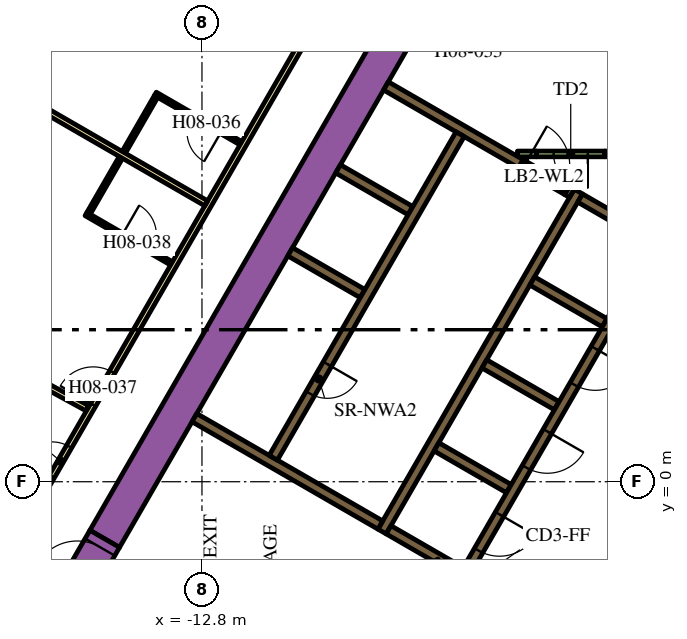
"""IFC4 building model, lengths in metres.
Left out: names, types, materials, properties, quantities, classifications, styles, units other than length and angle.
Written with IfcOpenShell. Run it as: python <this file> out.ifc"""

import sys

from ifc_helpers import new_model, si_unit, direction, frame, frame_2d, origin, place, context, subcontext, project, spatial, polyline, rectangle, outline, extrude, element, fill, save


model = new_model("IFC4")
c1 = context("Model", 3, precision=1e-05, world=origin(), true_north=direction((0.0, 1.0)))
c2 = subcontext(c1, "Body", "Model", "MODEL_VIEW")
j1 = project(units=[si_unit("LENGTHUNIT", "METRE"), si_unit("PLANEANGLEUNIT", "RADIAN")], contexts=[c1])
p1 = place(None, origin())
s1 = spatial("IfcSite", under=j1, at=p1, CompositionType="ELEMENT")
p2 = place(p1, origin())
s2 = spatial("IfcBuilding", under=s1, at=p2, CompositionType="ELEMENT")
p3 = place(p2, frame((0.0, 0.0, 107.1)))
s3 = spatial("IfcBuildingStorey", under=s2, at=p3, CompositionType="ELEMENT", Elevation=107.1)
p4 = place(p3, frame((-15.36, -1.503, 0.0), z_axis=(0.0, 0.0, 1.0), x_axis=(0.50000389221, 0.866023156604, 0.0)))
e1 = element("IfcWall", 1, at=p4, inside=s3, PredefinedType="SOLIDWALL", context=c2, shape_type="SweptSolid", body=[
    extrude(rectangle(XDim=21.0, YDim=0.9, at=frame_2d((10.5, 0.0))), origin(), (0.0, 0.0, 1.0), 3.9),
])
p5 = place(p3, frame((-8.06, -1.311, 0.0), z_axis=(0.0, 0.0, 1.0), x_axis=(0.50000273126, 0.866023826885, 0.0)))
e2 = element("IfcWall", 2, at=p5, inside=s3, PredefinedType="SOLIDWALL", context=c2, shape_type="SweptSolid", body=[
    extrude(rectangle(XDim=10.33, YDim=0.25, at=frame_2d((5.165, 0.0))), origin(), (0.0, 0.0, 1.0), 3.9),
])
p6 = place(p3, frame((-1.76, 6.836, 0.0), z_axis=(0.0, 0.0, 1.0), x_axis=(-0.865952863304, 0.500125622755, 0.0)))
e3 = element("IfcWall", 3, at=p6, inside=s3, PredefinedType="SOLIDWALL", context=c2, shape_type="SweptSolid", body=[
    extrude(rectangle(XDim=1.258, YDim=0.25, at=frame_2d((0.629, 0.0))), origin(), (0.0, 0.0, 1.0), 3.9),
])
for number, where, z_axis, x_axis in (
    (4, (-2.204, 4.182, 0.0), (0.0, 0.0, 1.0), (-0.866, 0.5, 0.0)),
    (5, (-5.369, 3.1, 0.0), (0.0, 0.0, 1.0), (0.866, -0.5, 0.0)),
    (6, (-4.724, -0.182, 0.0), (0.0, 0.0, 1.0), (-0.866, 0.5, 0.0)),
):
    element("IfcWall", number, at=place(p3, frame(where, z_axis=z_axis, x_axis=x_axis)), inside=s3, PredefinedType="SOLIDWALL", context=c2, shape_type="SweptSolid", body=[
        extrude(rectangle(XDim=2.2, YDim=0.25, at=frame_2d((1.1, 0.0))), origin(), (0.0, 0.0, 1.0), 3.9),
    ])
p7 = place(p3, origin())
e7 = element("IfcWall", 7, at=p7, inside=s3, PredefinedType="SOLIDWALL", context=c2, shape_type="SweptSolid", body=[
    extrude(outline(polyline([(-5.922, -2.257), (-5.922, -2.257), (-5.705, -2.382), (-5.83, -2.598), (-6.483, -2.221), (-6.591, -2.033), (-6.591, -2.033), (-6.7, -2.096), (-7.952, -1.373), (-7.827, -1.156), (-5.922, -2.257)])), origin(), (0.0, 0.0, 1.0), 3.9),
])
p8 = place(p3, frame((-8.106, -1.14, 0.0), z_axis=(0.0, 0.0, 1.0), x_axis=(-0.866000643155, 0.500042884217, 0.0)))
e8 = element("IfcWall", 8, at=p8, inside=s3, PredefinedType="SOLIDWALL", context=c2, shape_type="SweptSolid", body=[
    extrude(rectangle(XDim=5.65, YDim=0.25, at=frame_2d((2.825, 0.0))), origin(), (0.0, 0.0, 1.0), 3.9),
])
e9 = element("IfcWall", 9, at=p7, inside=s3, PredefinedType="SOLIDWALL", context=c2, shape_type="SweptSolid", body=[
    extrude(outline(polyline([(-3.128, 7.481), (-3.259, 7.557), (-3.134, 7.773), (-3.003, 7.698), (-3.128, 7.481)])), origin(), (0.0, 0.0, 1.0), 3.9),
])
for number, where, z_axis, x_axis in (
    (10, (-8.574, 4.95, 0.0), (0.0, 0.0, 1.0), (-0.866, 0.5, 0.0)),
    (11, (-7.314, 7.132, 0.0), (0.0, 0.0, 1.0), (-0.866, 0.5, 0.0)),
):
    element("IfcWall", number, at=place(p3, frame(where, z_axis=z_axis, x_axis=x_axis)), inside=s3, PredefinedType="SOLIDWALL", context=c2, shape_type="SweptSolid", body=[
        extrude(rectangle(XDim=2.2, YDim=0.25, at=frame_2d((1.1, 0.0))), origin(), (0.0, 0.0, 1.0), 3.9),
    ])
p9 = place(p3, frame((-7.959, 10.415, 0.0), z_axis=(0.0, 0.0, 1.0), x_axis=(0.866020958405, -0.500007699544, 0.0)))
e12 = element("IfcWall", 12, at=p9, inside=s3, PredefinedType="SOLIDWALL", context=c2, shape_type="SweptSolid", body=[
    extrude(rectangle(XDim=4.1, YDim=0.25, at=frame_2d((2.05, 0.0))), origin(), (0.0, 0.0, 1.0), 3.9),
])
p10 = place(p3, frame((-3.997, 8.625, 0.0), z_axis=(0.0, 0.0, 1.0), x_axis=(-1.0, 0.0, 0.0)))
e13 = element("IfcWall", 13, at=p10, inside=s3, PredefinedType="PARTITIONING", context=c2, shape_type="SweptSolid", body=[
    extrude(rectangle(XDim=0.502, YDim=0.15, at=frame_2d((0.251, 0.0))), origin(), (0.0, 0.0, 1.0), 2.75),
])
p11 = place(p3, frame((-2.196, 8.625, 0.0), z_axis=(0.0, 0.0, 1.0), x_axis=(1.0, 0.0, 0.0)))
e14 = element("IfcWall", 14, at=p11, inside=s3, PredefinedType="PARTITIONING", context=c2, shape_type="SweptSolid", body=[
    extrude(rectangle(XDim=1.146, YDim=0.15, at=frame_2d((0.573, 0.0))), origin(), (0.0, 0.0, 1.0), 2.75),
])
e15 = element("IfcWall", 15, at=p7, inside=s3, PredefinedType="PARTITIONING", context=c2, shape_type="SweptSolid", body=[
    extrude(outline(polyline([(-0.59, -0.872), (-0.265, -1.059), (-1.822, -3.756), (-2.147, -3.568), (-0.59, -0.872)])), origin(), (0.0, 0.0, 1.0), 2.75),
])
p12 = place(p3, frame((-6.008, 9.144, 0.0), z_axis=(0.0, 0.0, 1.0), x_axis=(-0.500006956611, -0.866021387346, 0.0)))
e16 = element("IfcWall", 16, at=p12, inside=s3, PredefinedType="SOLIDWALL", context=c2, shape_type="SweptSolid", body=[
    extrude(rectangle(XDim=9.83, YDim=0.25, at=frame_2d((4.915, 0.0))), origin(), (0.0, 0.0, 1.0), 3.9),
])
p13 = place(p12, frame((6.985, 0.0, 0.0)))
e17 = element("IfcOpeningElement", 17, at=p13, cuts=e16, PredefinedType="OPENING", context=c2, shape_type="SweptSolid", body=[
    extrude(rectangle(XDim=0.9, YDim=2.1, at=frame_2d((0.45, 1.05))), frame((0.0, 0.135, 0.0), z_axis=(0.0, -1.0, 0.0), x_axis=(1.0, 0.0, 0.0)), (0.0, 0.0, 1.0), 0.27),
])
p14 = place(p3, frame((-0.898, 6.194, 0.0), z_axis=(0.0, 0.0, 1.0), x_axis=(-0.499996202215, -0.866027596426, 0.0)))
e18 = element("IfcWall", 18, at=p14, inside=s3, PredefinedType="SOLIDWALL", context=c2, shape_type="SweptSolid", body=[
    extrude(rectangle(XDim=9.83, YDim=0.25, at=frame_2d((4.915, 0.0))), origin(), (0.0, 0.0, 1.0), 3.9),
])
p15 = place(p14, frame((0.585, 0.0, 0.0)))
e19 = element("IfcOpeningElement", 19, at=p15, cuts=e18, PredefinedType="OPENING", context=c2, shape_type="SweptSolid", body=[
    extrude(rectangle(XDim=1.1, YDim=2.1, at=frame_2d((0.55, 1.05))), frame((0.0, 0.135, 0.0), z_axis=(0.0, -1.0, 0.0), x_axis=(1.0, 0.0, 0.0)), (0.0, 0.0, 1.0), 0.27),
])
p16 = place(p14, frame((3.105, 0.0, 0.0)))
e20 = element("IfcOpeningElement", 20, at=p16, cuts=e18, PredefinedType="OPENING", context=c2, shape_type="SweptSolid", body=[
    extrude(rectangle(XDim=1.1, YDim=2.1, at=frame_2d((0.55, 1.05))), frame((0.0, 0.135, 0.0), z_axis=(0.0, -1.0, 0.0), x_axis=(1.0, 0.0, 0.0)), (0.0, 0.0, 1.0), 0.27),
])
p17 = place(p14, frame((5.625, 0.0, 0.0)))
e21 = element("IfcOpeningElement", 21, at=p17, cuts=e18, PredefinedType="OPENING", context=c2, shape_type="SweptSolid", body=[
    extrude(rectangle(XDim=1.1, YDim=2.1, at=frame_2d((0.55, 1.05))), frame((0.0, 0.135, 0.0), z_axis=(0.0, -1.0, 0.0), x_axis=(1.0, 0.0, 0.0)), (0.0, 0.0, 1.0), 0.27),
])
p18 = place(p14, frame((8.145, 0.0, 0.0)))
e22 = element("IfcOpeningElement", 22, at=p18, cuts=e18, PredefinedType="OPENING", context=c2, shape_type="SweptSolid", body=[
    extrude(rectangle(XDim=1.1, YDim=2.1, at=frame_2d((0.55, 1.05))), frame((0.0, 0.135, 0.0), z_axis=(0.0, -1.0, 0.0), x_axis=(1.0, 0.0, 0.0)), (0.0, 0.0, 1.0), 0.27),
])
p19 = place(p3, frame((-2.196, 8.625, 0.0), z_axis=(0.0, 0.0, 1.0), x_axis=(-1.0, 0.0, 0.0)))
e23 = element("IfcWall", 23, at=p19, inside=s3, PredefinedType="PARTITIONING", context=c2, shape_type="SweptSolid", body=[
    extrude(rectangle(XDim=1.8, YDim=0.15, at=frame_2d((0.9, 0.0))), origin(), (0.0, 0.0, 1.0), 2.75),
])
p20 = place(p19, frame((0.45, 0.0, 0.0)))
e24 = element("IfcOpeningElement", 24, at=p20, cuts=e23, PredefinedType="OPENING", context=c2, shape_type="SweptSolid", body=[
    extrude(rectangle(XDim=0.9, YDim=2.1, at=frame_2d((0.45, 1.05))), frame((0.0, 0.085, 0.0), z_axis=(0.0, -1.0, 0.0), x_axis=(1.0, 0.0, 0.0)), (0.0, 0.0, 1.0), 0.17),
])
p21 = place(p3, frame((-4.409, 8.365, 0.0), z_axis=(0.0, 0.0, 1.0), x_axis=(0.866034573852, -0.49998411664, 0.0)))
e25 = element("IfcWall", 25, at=p21, inside=s3, PredefinedType="SOLIDWALL", context=c2, shape_type="SweptSolid", body=[
    extrude(rectangle(XDim=1.4, YDim=0.25, at=frame_2d((0.7, 0.0))), origin(), (0.0, 0.0, 1.0), 3.9),
])
p22 = place(p21, frame((0.1, 0.0, 0.0)))
e26 = element("IfcOpeningElement", 26, at=p22, cuts=e25, PredefinedType="OPENING", context=c2, shape_type="SweptSolid", body=[
    extrude(rectangle(XDim=1.2, YDim=2.1, at=frame_2d((0.6, 1.05))), frame((0.0, 0.135, 0.0), z_axis=(0.0, -1.0, 0.0), x_axis=(1.0, 0.0, 0.0)), (0.0, 0.0, 1.0), 0.27),
])
p23 = place(p3, frame((-16.209, -2.976, 0.0), z_axis=(0.0, 0.0, 1.0), x_axis=(0.499954529098, 0.86605165483, 0.0)))
e27 = element("IfcWall", 27, at=p23, inside=s3, PredefinedType="SOLIDWALL", context=c2, shape_type="SweptSolid", body=[
    extrude(rectangle(XDim=1.7, YDim=0.9, at=frame_2d((0.85, 0.0))), origin(), (0.0, 0.0, 1.0), 3.9),
])
p24 = place(p23, frame((0.25, 0.0, 0.0)))
e28 = element("IfcOpeningElement", 28, at=p24, cuts=e27, PredefinedType="OPENING", context=c2, shape_type="SweptSolid", body=[
    extrude(rectangle(XDim=1.2, YDim=2.1, at=frame_2d((0.6, 1.05))), frame((0.0, 0.46, 0.0), z_axis=(0.0, -1.0, 0.0), x_axis=(1.0, 0.0, 0.0)), (0.0, 0.0, 1.0), 0.92),
])
p25 = place(p3, frame((-19.081, -3.9, 0.0), z_axis=(0.0, 0.0, 1.0), x_axis=(0.499998313975, 0.866026377209, 0.0)))
e29 = element("IfcWall", 29, at=p25, inside=s3, PredefinedType="PARTITIONING", context=c2, shape_type="SweptSolid", body=[
    extrude(rectangle(XDim=25.766, YDim=0.15, at=frame_2d((12.883, 0.0))), origin(), (0.0, 0.0, 1.0), 2.75),
])
p26 = place(p25, frame((19.306, 0.0, 0.0)))
e30 = element("IfcOpeningElement", 30, at=p26, cuts=e29, PredefinedType="OPENING", context=c2, shape_type="SweptSolid", body=[
    extrude(rectangle(XDim=1.0, YDim=2.1, at=frame_2d((0.5, 1.05))), frame((0.0, 0.085, 0.0), z_axis=(0.0, -1.0, 0.0), x_axis=(1.0, 0.0, 0.0)), (0.0, 0.0, 1.0), 0.17),
])
p27 = place(p25, frame((18.0, 0.0, 0.0)))
e31 = element("IfcOpeningElement", 31, at=p27, cuts=e29, PredefinedType="OPENING", context=c2, shape_type="SweptSolid", body=[
    extrude(rectangle(XDim=1.0, YDim=2.1, at=frame_2d((0.5, 1.05))), frame((0.0, 0.085, 0.0), z_axis=(0.0, -1.0, 0.0), x_axis=(1.0, 0.0, 0.0)), (0.0, 0.0, 1.0), 0.17),
])
p28 = place(p25, frame((6.838, 0.0, 0.0)))
e32 = element("IfcOpeningElement", 32, at=p28, cuts=e29, PredefinedType="OPENING", context=c2, shape_type="SweptSolid", body=[
    extrude(rectangle(XDim=1.0, YDim=2.1, at=frame_2d((0.5, 1.05))), frame((0.0, 0.085, 0.0), z_axis=(0.0, -1.0, 0.0), x_axis=(1.0, 0.0, 0.0)), (0.0, 0.0, 1.0), 0.17),
])
p29 = place(p25, frame((4.674, 0.0, 0.0)))
e33 = element("IfcOpeningElement", 33, at=p29, cuts=e29, PredefinedType="OPENING", context=c2, shape_type="SweptSolid", body=[
    extrude(rectangle(XDim=0.9, YDim=2.1, at=frame_2d((0.45, 1.05))), frame((0.0, 0.085, 0.0), z_axis=(0.0, -1.0, 0.0), x_axis=(1.0, 0.0, 0.0)), (0.0, 0.0, 1.0), 0.17),
])
p30 = place(p25, frame((0.18, 0.0, 0.0)))
e34 = element("IfcOpeningElement", 34, at=p30, cuts=e29, PredefinedType="OPENING", context=c2, shape_type="SweptSolid", body=[
    extrude(rectangle(XDim=1.0, YDim=2.1, at=frame_2d((0.5, 1.05))), frame((0.0, 0.085, 0.0), z_axis=(0.0, -1.0, 0.0), x_axis=(1.0, 0.0, 0.0)), (0.0, 0.0, 1.0), 0.17),
])
p31 = place(p3, frame((-21.614, 5.102, 0.0), z_axis=(0.0, 0.0, 1.0), x_axis=(0.877484555087, -0.479604895287, 0.0)))
e35 = element("IfcWall", 35, at=p31, inside=s3, PredefinedType="PARTITIONING", context=c2, shape_type="SweptSolid", body=[
    extrude(rectangle(XDim=6.611, YDim=0.15, at=frame_2d((3.306, 0.0))), origin(), (0.0, 0.0, 1.0), 2.75),
])
p32 = place(p3, frame((-18.484, 10.672, 0.0), z_axis=(0.0, 0.0, 1.0), x_axis=(0.866019162053, -0.50001081084, 0.0)))
e36 = element("IfcWall", 36, at=p32, inside=s3, PredefinedType="PARTITIONING", context=c2, shape_type="SweptSolid", body=[
    extrude(rectangle(XDim=6.694, YDim=0.15, at=frame_2d((3.347, 0.0))), origin(), (0.0, 0.0, 1.0), 2.75),
])
p33 = place(p3, frame((-11.774, 8.906, 0.0), z_axis=(0.0, 0.0, 1.0), x_axis=(-0.865997922154, 0.500047596559, 0.0)))
e37 = element("IfcWall", 37, at=p33, inside=s3, PredefinedType="PARTITIONING", context=c2, shape_type="SweptSolid", body=[
    extrude(rectangle(XDim=2.6, YDim=0.1, at=frame_2d((1.3, 0.0))), origin(), (0.0, 0.0, 1.0), 2.75),
])
p34 = place(p33, frame((0.6, 0.0, 0.0)))
e38 = element("IfcOpeningElement", 38, at=p34, cuts=e37, PredefinedType="OPENING", context=c2, shape_type="SweptSolid", body=[
    extrude(rectangle(XDim=0.9, YDim=2.1, at=frame_2d((0.45, 1.05))), frame((0.0, 0.06, 0.0), z_axis=(0.0, -1.0, 0.0), x_axis=(1.0, 0.0, 0.0)), (0.0, 0.0, 1.0), 0.12),
])
p35 = place(p3, frame((-14.008, 10.138, 0.0), z_axis=(0.0, 0.0, 1.0), x_axis=(-0.499892348375, -0.866087547558, 0.0)))
e39 = element("IfcWall", 39, at=p35, inside=s3, PredefinedType="PARTITIONING", context=c2, shape_type="SweptSolid", body=[
    extrude(rectangle(XDim=1.7, YDim=0.1, at=frame_2d((0.85, 0.0))), origin(), (0.0, 0.0, 1.0), 2.75),
])
p36 = place(p3, frame((-15.852, 7.044, 0.0), z_axis=(0.0, 0.0, 1.0), x_axis=(0.866021400173, -0.500006934395, 0.0)))
e40 = element("IfcWall", 40, at=p36, inside=s3, PredefinedType="PARTITIONING", context=c2, shape_type="SweptSolid", body=[
    extrude(rectangle(XDim=2.6, YDim=0.1, at=frame_2d((1.3, 0.0))), origin(), (0.0, 0.0, 1.0), 2.75),
])
p37 = place(p36, frame((1.1, 0.0, 0.0)))
e41 = element("IfcOpeningElement", 41, at=p37, cuts=e40, PredefinedType="OPENING", context=c2, shape_type="SweptSolid", body=[
    extrude(rectangle(XDim=0.9, YDim=2.1, at=frame_2d((0.45, 1.05))), frame((0.0, 0.06, 0.0), z_axis=(0.0, -1.0, 0.0), x_axis=(1.0, 0.0, 0.0)), (0.0, 0.0, 1.0), 0.12),
])
p38 = place(p3, frame((-15.783, 7.062, 0.0), z_axis=(0.0, 0.0, 1.0), x_axis=(0.499954529098, 0.86605165483, 0.0)))
e42 = element("IfcWall", 42, at=p38, inside=s3, PredefinedType="PARTITIONING", context=c2, shape_type="SweptSolid", body=[
    extrude(rectangle(XDim=1.7, YDim=0.1, at=frame_2d((0.85, 0.0))), origin(), (0.0, 0.0, 1.0), 2.75),
])
p39 = place(p13, origin())
e43 = element("IfcDoor", 43, at=p39, inside=s3, OperationType="SINGLE_SWING_LEFT", PredefinedType="DOOR", context=c2, shape_type="SweptSolid", body=[
    extrude(rectangle(XDim=0.9, YDim=2.1, at=frame_2d((0.45, 1.05))), frame((0.0, 0.025, 0.0), z_axis=(0.0, -1.0, 0.0), x_axis=(1.0, 0.0, 0.0)), (0.0, 0.0, 1.0), 0.05),
])
fill(e17, e43)
p40 = place(p16, origin())
e44 = element("IfcDoor", 44, at=p40, inside=s3, OperationType="DOUBLE_DOOR_SLIDING", PredefinedType="DOOR", context=c2, shape_type="SweptSolid", body=[
    extrude(rectangle(XDim=1.1, YDim=2.1, at=frame_2d((0.55, 1.05))), frame((0.0, 0.025, 0.0), z_axis=(0.0, -1.0, 0.0), x_axis=(1.0, 0.0, 0.0)), (0.0, 0.0, 1.0), 0.05),
])
fill(e20, e44)
p41 = place(p17, origin())
e45 = element("IfcDoor", 45, at=p41, inside=s3, OperationType="DOUBLE_DOOR_SLIDING", PredefinedType="DOOR", context=c2, shape_type="SweptSolid", body=[
    extrude(rectangle(XDim=1.1, YDim=2.1, at=frame_2d((0.55, 1.05))), frame((0.0, 0.025, 0.0), z_axis=(0.0, -1.0, 0.0), x_axis=(1.0, 0.0, 0.0)), (0.0, 0.0, 1.0), 0.05),
])
fill(e21, e45)
p42 = place(p18, origin())
e46 = element("IfcDoor", 46, at=p42, inside=s3, OperationType="DOUBLE_DOOR_SLIDING", PredefinedType="DOOR", context=c2, shape_type="SweptSolid", body=[
    extrude(rectangle(XDim=1.1, YDim=2.1, at=frame_2d((0.55, 1.05))), frame((0.0, 0.025, 0.0), z_axis=(0.0, -1.0, 0.0), x_axis=(1.0, 0.0, 0.0)), (0.0, 0.0, 1.0), 0.05),
])
fill(e22, e46)
p43 = place(p20, origin())
e47 = element("IfcDoor", 47, at=p43, inside=s3, OperationType="SINGLE_SWING_LEFT", PredefinedType="DOOR", context=c2, shape_type="SweptSolid", body=[
    extrude(rectangle(XDim=0.9, YDim=2.1, at=frame_2d((0.45, 1.05))), frame((0.0, 0.025, 0.0), z_axis=(0.0, -1.0, 0.0), x_axis=(1.0, 0.0, 0.0)), (0.0, 0.0, 1.0), 0.05),
])
fill(e24, e47)
p44 = place(p22, origin())
e48 = element("IfcDoor", 48, at=p44, inside=s3, OperationType="SINGLE_SWING_LEFT", PredefinedType="DOOR", context=c2, shape_type="SweptSolid", body=[
    extrude(rectangle(XDim=1.2, YDim=2.1, at=frame_2d((0.6, 1.05))), frame((0.0, 0.025, 0.0), z_axis=(0.0, -1.0, 0.0), x_axis=(1.0, 0.0, 0.0)), (0.0, 0.0, 1.0), 0.05),
])
fill(e26, e48)
p45 = place(p24, origin())
e49 = element("IfcDoor", 49, at=p45, inside=s3, OperationType="SINGLE_SWING_LEFT", PredefinedType="DOOR", context=c2, shape_type="SweptSolid", body=[
    extrude(rectangle(XDim=1.2, YDim=2.1, at=frame_2d((0.6, 1.05))), frame((0.0, 0.025, 0.0), z_axis=(0.0, -1.0, 0.0), x_axis=(1.0, 0.0, 0.0)), (0.0, 0.0, 1.0), 0.05),
])
fill(e28, e49)
p46 = place(p34, origin())
e50 = element("IfcDoor", 50, at=p46, inside=s3, OperationType="SINGLE_SWING_LEFT", PredefinedType="DOOR", context=c2, shape_type="SweptSolid", body=[
    extrude(rectangle(XDim=0.9, YDim=2.1, at=frame_2d((0.45, 1.05))), frame((0.0, 0.025, 0.0), z_axis=(0.0, -1.0, 0.0), x_axis=(1.0, 0.0, 0.0)), (0.0, 0.0, 1.0), 0.05),
])
fill(e38, e50)
p47 = place(p28, origin())
e51 = element("IfcDoor", 51, at=p47, inside=s3, OperationType="SINGLE_SWING_LEFT", PredefinedType="DOOR", context=c2, shape_type="SweptSolid", body=[
    extrude(rectangle(XDim=1.0, YDim=2.1, at=frame_2d((0.5, 1.05))), frame((0.0, 0.025, 0.0), z_axis=(0.0, -1.0, 0.0), x_axis=(1.0, 0.0, 0.0)), (0.0, 0.0, 1.0), 0.05),
])
fill(e32, e51)
p48 = place(p37, origin())
e52 = element("IfcDoor", 52, at=p48, inside=s3, OperationType="SINGLE_SWING_RIGHT", PredefinedType="DOOR", context=c2, shape_type="SweptSolid", body=[
    extrude(rectangle(XDim=0.9, YDim=2.1, at=frame_2d((0.45, 1.05))), frame((0.0, 0.025, 0.0), z_axis=(0.0, -1.0, 0.0), x_axis=(1.0, 0.0, 0.0)), (0.0, 0.0, 1.0), 0.05),
])
fill(e41, e52)
p49 = place(p29, origin())
e53 = element("IfcDoor", 53, at=p49, inside=s3, OperationType="SINGLE_SWING_RIGHT", PredefinedType="DOOR", context=c2, shape_type="SweptSolid", body=[
    extrude(rectangle(XDim=0.9, YDim=2.1, at=frame_2d((0.45, 1.05))), frame((0.0, 0.025, 0.0), z_axis=(0.0, -1.0, 0.0), x_axis=(1.0, 0.0, 0.0)), (0.0, 0.0, 1.0), 0.05),
])
fill(e33, e53)
save(model, sys.argv[1])
